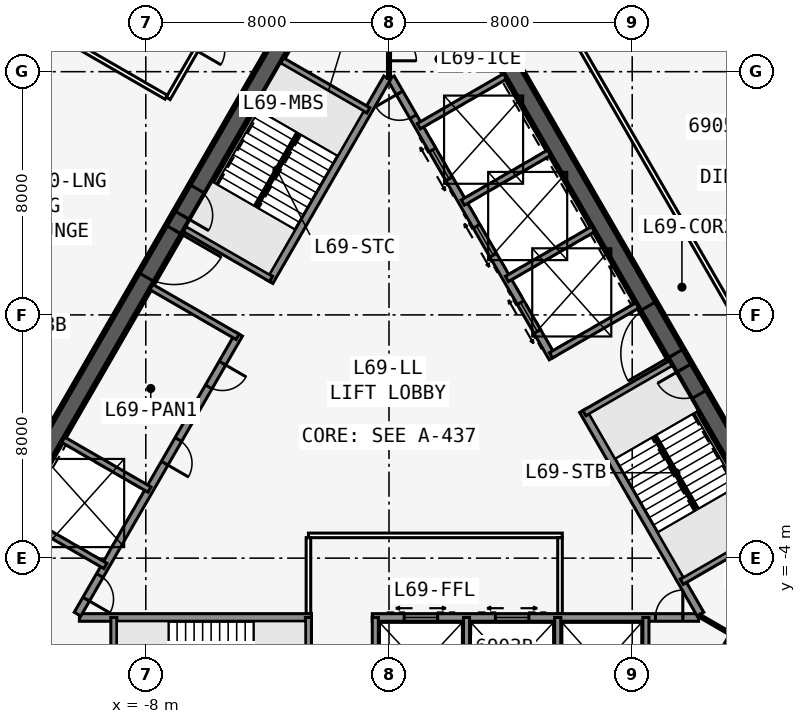
"""IFC4 building model, lengths in metres.
Left out: names, types, materials, properties, quantities, classifications, styles, units other than length and angle.
Written with IfcOpenShell. Run it as: python <this file> out.ifc"""

import sys

from ifc_helpers import new_model, si_unit, direction, frame, frame_2d, origin, place, context, subcontext, project, spatial, rectangle, extrude, element, fill, save


model = new_model("IFC4")
c1 = context("Model", 3, precision=1e-05, world=origin(), true_north=direction((0.0, 1.0)))
c2 = subcontext(c1, "Body", "Model", "MODEL_VIEW")
j1 = project(units=[si_unit("LENGTHUNIT", "METRE"), si_unit("PLANEANGLEUNIT", "RADIAN")], contexts=[c1])
p1 = place(None, origin())
s1 = spatial("IfcSite", under=j1, at=p1, CompositionType="ELEMENT")
p2 = place(p1, origin())
s2 = spatial("IfcBuilding", under=s1, at=p2, CompositionType="ELEMENT")
p3 = place(p2, frame((0.0, 0.0, 260.9)))
s3 = spatial("IfcBuildingStorey", under=s2, at=p3, CompositionType="ELEMENT", Elevation=260.9)
p4 = place(p3, frame((-10.183, -5.951, 0.0), z_axis=(0.0, 0.0, 1.0), x_axis=(1.0, 0.0, 0.0)))
e1 = element("IfcWall", 1, at=p4, inside=s3, PredefinedType="SOLIDWALL", context=c2, shape_type="SweptSolid", body=[
    extrude(rectangle(XDim=7.633, YDim=0.25, at=frame_2d((3.816, 0.0))), origin(), (0.0, 0.0, 1.0), 3.435),
])
p5 = place(p3, frame((-0.55, -5.951, 0.0), z_axis=(0.0, 0.0, 1.0), x_axis=(1.0, 0.0, 0.0)))
e2 = element("IfcWall", 2, at=p5, inside=s3, PredefinedType="SOLIDWALL", context=c2, shape_type="SweptSolid", body=[
    extrude(rectangle(XDim=10.733, YDim=0.25, at=frame_2d((5.366, 0.0))), origin(), (0.0, 0.0, 1.0), 3.435),
])
p6 = place(p5, frame((9.314, 0.0, 0.0)))
e3 = element("IfcOpeningElement", 3, at=p6, cuts=e2, PredefinedType="OPENING", context=c2, shape_type="SweptSolid", body=[
    extrude(rectangle(XDim=0.9, YDim=2.13, at=frame_2d((0.45, 1.065))), frame((0.0, 0.135, 0.0), z_axis=(0.0, -1.0, 0.0), x_axis=(1.0, 0.0, 0.0)), (0.0, 0.0, 1.0), 0.27),
])
p7 = place(p5, frame((1.05, 0.0, 0.0)))
e4 = element("IfcOpeningElement", 4, at=p7, cuts=e2, PredefinedType="OPENING", context=c2, shape_type="SweptSolid", body=[
    extrude(rectangle(XDim=1.1, YDim=2.13, at=frame_2d((0.55, 1.065))), frame((0.0, 0.135, 0.0), z_axis=(0.0, -1.0, 0.0), x_axis=(1.0, 0.0, 0.0)), (0.0, 0.0, 1.0), 0.27),
])
p8 = place(p5, frame((4.05, 0.0, 0.0)))
e5 = element("IfcOpeningElement", 5, at=p8, cuts=e2, PredefinedType="OPENING", context=c2, shape_type="SweptSolid", body=[
    extrude(rectangle(XDim=1.1, YDim=2.13, at=frame_2d((0.55, 1.065))), frame((0.0, 0.135, 0.0), z_axis=(0.0, -1.0, 0.0), x_axis=(1.0, 0.0, 0.0)), (0.0, 0.0, 1.0), 0.27),
])
p9 = place(p3, frame((-9.05, -5.951, 0.0), z_axis=(0.0, 0.0, 1.0), x_axis=(0.0, -1.0, 0.0)))
e6 = element("IfcWall", 6, at=p9, inside=s3, PredefinedType="SOLIDWALL", context=c2, shape_type="SweptSolid", body=[
    extrude(rectangle(XDim=3.275, YDim=0.2, at=frame_2d((1.637, 0.0))), origin(), (0.0, 0.0, 1.0), 3.435),
])
p10 = place(p3, frame((-2.65, -5.951, 0.0), z_axis=(0.0, 0.0, 1.0), x_axis=(0.0, -1.0, 0.0)))
e7 = element("IfcWall", 7, at=p10, inside=s3, PredefinedType="SOLIDWALL", context=c2, shape_type="SweptSolid", body=[
    extrude(rectangle(XDim=3.275, YDim=0.2, at=frame_2d((1.637, 0.0))), origin(), (0.0, 0.0, 1.0), 3.435),
])
p11 = place(p10, frame((1.675, 0.0, 0.0)))
e8 = element("IfcOpeningElement", 8, at=p11, cuts=e7, PredefinedType="OPENING", context=c2, shape_type="SweptSolid", body=[
    extrude(rectangle(XDim=1.0, YDim=2.13, at=frame_2d((0.5, 1.065))), frame((0.0, 0.11, 0.0), z_axis=(0.0, -1.0, 0.0), x_axis=(1.0, 0.0, 0.0)), (0.0, 0.0, 1.0), 0.22),
])
for number, where, z_axis, x_axis in (
    (9, (-0.45, -5.951, 0.0), (0.0, 0.0, 1.0), (0.0, -1.0, 0.0)),
    (10, (2.55, -5.951, 0.0), (0.0, 0.0, 1.0), (0.0, -1.0, 0.0)),
    (11, (5.55, -5.951, 0.0), (0.0, 0.0, 1.0), (0.0, -1.0, 0.0)),
    (12, (8.45, -5.951, 0.0), (0.0, 0.0, 1.0), (0.0, -1.0, 0.0)),
):
    element("IfcWall", number, at=place(p3, frame(where, z_axis=z_axis, x_axis=x_axis)), inside=s3, PredefinedType="SOLIDWALL", context=c2, shape_type="SweptSolid", body=[
        extrude(rectangle(XDim=3.275, YDim=0.2, at=frame_2d((1.637, 0.0))), origin(), (0.0, 0.0, 1.0), 3.435),
    ])
p12 = place(p3, frame((16.5, -9.526, 0.0), z_axis=(0.0, 0.0, 1.0), x_axis=(-0.499999749417, 0.866025548458, 0.0)))
e13 = element("IfcWall", 13, at=p12, inside=s3, PredefinedType="SHEAR", context=c2, shape_type="SweptSolid", body=[
    extrude(rectangle(XDim=33.0, YDim=0.6, at=frame_2d((16.5, 0.0))), origin(), (0.0, 0.0, 1.0), 3.6),
])
p13 = place(p12, frame((14.15, 0.0, 0.0)))
e14 = element("IfcOpeningElement", 14, at=p13, cuts=e13, PredefinedType="OPENING", context=c2, shape_type="SweptSolid", body=[
    extrude(rectangle(XDim=1.8, YDim=2.13, at=frame_2d((0.9, 1.065))), frame((0.0, 0.31, 0.0), z_axis=(0.0, -1.0, 0.0), x_axis=(1.0, 0.0, 0.0)), (0.0, 0.0, 1.0), 0.62),
])
p14 = place(p12, frame((12.6, 0.0, 0.0)))
e15 = element("IfcOpeningElement", 15, at=p14, cuts=e13, PredefinedType="OPENING", context=c2, shape_type="SweptSolid", body=[
    extrude(rectangle(XDim=1.0, YDim=2.13, at=frame_2d((0.5, 1.065))), frame((0.0, 0.31, 0.0), z_axis=(0.0, -1.0, 0.0), x_axis=(1.0, 0.0, 0.0)), (0.0, 0.0, 1.0), 0.62),
])
p15 = place(p3, frame((10.245, -5.843, 0.0), z_axis=(0.0, 0.0, 1.0), x_axis=(-0.499993009313, 0.866029439822, 0.0)))
e16 = element("IfcWall", 16, at=p15, inside=s3, PredefinedType="SOLIDWALL", context=c2, shape_type="SweptSolid", body=[
    extrude(rectangle(XDim=7.733, YDim=0.25, at=frame_2d((3.866, 0.0))), origin(), (0.0, 0.0, 1.0), 3.435),
])
p16 = place(p3, frame((5.379, 2.586, 0.0), z_axis=(0.0, 0.0, 1.0), x_axis=(-0.500001375892, 0.866024609411, 0.0)))
e17 = element("IfcWall", 17, at=p16, inside=s3, PredefinedType="SOLIDWALL", context=c2, shape_type="SweptSolid", body=[
    extrude(rectangle(XDim=10.633, YDim=0.25, at=frame_2d((5.316, 0.0))), origin(), (0.0, 0.0, 1.0), 3.435),
])
p17 = place(p16, frame((9.164, 0.0, 0.0)))
e18 = element("IfcOpeningElement", 18, at=p17, cuts=e17, PredefinedType="OPENING", context=c2, shape_type="SweptSolid", body=[
    extrude(rectangle(XDim=0.9, YDim=2.13, at=frame_2d((0.45, 1.065))), frame((0.0, 0.135, 0.0), z_axis=(0.0, -1.0, 0.0), x_axis=(1.0, 0.0, 0.0)), (0.0, 0.0, 1.0), 0.27),
])
p18 = place(p16, frame((1.0, 0.0, 0.0)))
e19 = element("IfcOpeningElement", 19, at=p18, cuts=e17, PredefinedType="OPENING", context=c2, shape_type="SweptSolid", body=[
    extrude(rectangle(XDim=1.1, YDim=2.13, at=frame_2d((0.55, 1.065))), frame((0.0, 0.135, 0.0), z_axis=(0.0, -1.0, 0.0), x_axis=(1.0, 0.0, 0.0)), (0.0, 0.0, 1.0), 0.27),
])
p19 = place(p16, frame((3.9, 0.0, 0.0)))
e20 = element("IfcOpeningElement", 20, at=p19, cuts=e17, PredefinedType="OPENING", context=c2, shape_type="SweptSolid", body=[
    extrude(rectangle(XDim=1.1, YDim=2.13, at=frame_2d((0.55, 1.065))), frame((0.0, 0.135, 0.0), z_axis=(0.0, -1.0, 0.0), x_axis=(1.0, 0.0, 0.0)), (0.0, 0.0, 1.0), 0.27),
])
p20 = place(p16, frame((6.8, 0.0, 0.0)))
e21 = element("IfcOpeningElement", 21, at=p20, cuts=e17, PredefinedType="OPENING", context=c2, shape_type="SweptSolid", body=[
    extrude(rectangle(XDim=1.1, YDim=2.13, at=frame_2d((0.55, 1.065))), frame((0.0, 0.135, 0.0), z_axis=(0.0, -1.0, 0.0), x_axis=(1.0, 0.0, 0.0)), (0.0, 0.0, 1.0), 0.27),
])
p21 = place(p3, frame((9.629, -4.775, 0.0), z_axis=(0.0, 0.0, 1.0), x_axis=(0.865995643347, 0.500051543047, 0.0)))
e22 = element("IfcWall", 22, at=p21, inside=s3, PredefinedType="SOLIDWALL", context=c2, shape_type="SweptSolid", body=[
    extrude(rectangle(XDim=3.275, YDim=0.2, at=frame_2d((1.638, 0.0))), origin(), (0.0, 0.0, 1.0), 3.435),
])
for number, where, z_axis, x_axis in (
    (23, (6.429, 0.767, 0.0), (0.0, 0.0, 1.0), (0.866, 0.5, 0.0)),
    (24, (5.329, 2.673, 0.0), (0.0, 0.0, 1.0), (0.866, 0.5, 0.0)),
    (25, (3.879, 5.184, 0.0), (0.0, 0.0, 1.0), (0.866, 0.5, 0.0)),
    (26, (2.429, 7.696, 0.0), (0.0, 0.0, 1.0), (0.866, 0.5, 0.0)),
    (27, (0.979, 10.207, 0.0), (0.0, 0.0, 1.0), (0.866, 0.5, 0.0)),
):
    element("IfcWall", number, at=place(p3, frame(where, z_axis=z_axis, x_axis=x_axis)), inside=s3, PredefinedType="SOLIDWALL", context=c2, shape_type="SweptSolid", body=[
        extrude(rectangle(XDim=3.275, YDim=0.2, at=frame_2d((1.637, 0.0))), origin(), (0.0, 0.0, 1.0), 3.435),
    ])
p22 = place(p3, frame((0.0, 19.052, 0.0), z_axis=(0.0, 0.0, 1.0), x_axis=(-0.499999749417, -0.866025548458, 0.0)))
e28 = element("IfcWall", 28, at=p22, inside=s3, PredefinedType="SHEAR", context=c2, shape_type="SweptSolid", body=[
    extrude(rectangle(XDim=33.0, YDim=0.6, at=frame_2d((16.5, 0.0))), origin(), (0.0, 0.0, 1.0), 3.6),
])
p23 = place(p22, frame((14.15, 0.0, 0.0)))
e29 = element("IfcOpeningElement", 29, at=p23, cuts=e28, PredefinedType="OPENING", context=c2, shape_type="SweptSolid", body=[
    extrude(rectangle(XDim=1.8, YDim=2.13, at=frame_2d((0.9, 1.065))), frame((0.0, 0.31, 0.0), z_axis=(0.0, -1.0, 0.0), x_axis=(1.0, 0.0, 0.0)), (0.0, 0.0, 1.0), 0.62),
])
p24 = place(p22, frame((12.6, 0.0, 0.0)))
e30 = element("IfcOpeningElement", 30, at=p24, cuts=e28, PredefinedType="OPENING", context=c2, shape_type="SweptSolid", body=[
    extrude(rectangle(XDim=1.0, YDim=2.13, at=frame_2d((0.5, 1.065))), frame((0.0, 0.31, 0.0), z_axis=(0.0, -1.0, 0.0), x_axis=(1.0, 0.0, 0.0)), (0.0, 0.0, 1.0), 0.62),
])
p25 = place(p3, frame((-0.062, 11.794, 0.0), z_axis=(0.0, 0.0, 1.0), x_axis=(-0.500006680225, -0.86602154692, 0.0)))
e31 = element("IfcWall", 31, at=p25, inside=s3, PredefinedType="SOLIDWALL", context=c2, shape_type="SweptSolid", body=[
    extrude(rectangle(XDim=7.733, YDim=0.25, at=frame_2d((3.866, 0.0))), origin(), (0.0, 0.0, 1.0), 3.435),
])
p26 = place(p3, frame((-4.929, 3.365, 0.0), z_axis=(0.0, 0.0, 1.0), x_axis=(-0.499991433582, -0.866030349552, 0.0)))
e32 = element("IfcWall", 32, at=p26, inside=s3, PredefinedType="SOLIDWALL", context=c2, shape_type="SweptSolid", body=[
    extrude(rectangle(XDim=10.633, YDim=0.25, at=frame_2d((5.316, 0.0))), origin(), (0.0, 0.0, 1.0), 3.435),
])
p27 = place(p26, frame((9.164, 0.0, 0.0)))
e33 = element("IfcOpeningElement", 33, at=p27, cuts=e32, PredefinedType="OPENING", context=c2, shape_type="SweptSolid", body=[
    extrude(rectangle(XDim=0.9, YDim=2.13, at=frame_2d((0.45, 1.065))), frame((0.0, 0.135, 0.0), z_axis=(0.0, -1.0, 0.0), x_axis=(1.0, 0.0, 0.0)), (0.0, 0.0, 1.0), 0.27),
])
p28 = place(p26, frame((1.1, 0.0, 0.0)))
e34 = element("IfcOpeningElement", 34, at=p28, cuts=e32, PredefinedType="OPENING", context=c2, shape_type="SweptSolid", body=[
    extrude(rectangle(XDim=0.9, YDim=2.13, at=frame_2d((0.45, 1.065))), frame((0.0, 0.135, 0.0), z_axis=(0.0, -1.0, 0.0), x_axis=(1.0, 0.0, 0.0)), (0.0, 0.0, 1.0), 0.27),
])
p29 = place(p26, frame((4.0, 0.0, 0.0)))
e35 = element("IfcOpeningElement", 35, at=p29, cuts=e32, PredefinedType="OPENING", context=c2, shape_type="SweptSolid", body=[
    extrude(rectangle(XDim=0.9, YDim=2.13, at=frame_2d((0.45, 1.065))), frame((0.0, 0.135, 0.0), z_axis=(0.0, -1.0, 0.0), x_axis=(1.0, 0.0, 0.0)), (0.0, 0.0, 1.0), 0.27),
])
for number, where, z_axis, x_axis in (
    (36, (-0.679, 10.727, 0.0), (0.0, 0.0, 1.0), (-0.866, 0.5, 0.0)),
    (37, (-3.879, 5.184, 0.0), (0.0, 0.0, 1.0), (-0.866, 0.5, 0.0)),
    (38, (-4.979, 3.279, 0.0), (0.0, 0.0, 1.0), (-0.866, 0.5, 0.0)),
    (39, (-7.879, -1.744, 0.0), (0.0, 0.0, 1.0), (-0.866, 0.5, 0.0)),
    (40, (-9.329, -4.256, 0.0), (0.0, 0.0, 1.0), (-0.866, 0.5, 0.0)),
):
    element("IfcWall", number, at=place(p3, frame(where, z_axis=z_axis, x_axis=x_axis)), inside=s3, PredefinedType="SOLIDWALL", context=c2, shape_type="SweptSolid", body=[
        extrude(rectangle(XDim=3.275, YDim=0.2, at=frame_2d((1.637, 0.0))), origin(), (0.0, 0.0, 1.0), 3.435),
    ])
p30 = place(p3, frame((20.177, -11.245, 0.0), z_axis=(0.0, 0.0, 1.0), x_axis=(-0.499998875317, 0.866026053119, 0.0)))
e41 = element("IfcWall", 41, at=p30, inside=s3, PredefinedType="PARTITIONING", context=c2, shape_type="SweptSolid", body=[
    extrude(rectangle(XDim=39.654, YDim=0.15, at=frame_2d((19.827, 0.0))), origin(), (0.0, 0.0, 1.0), 3.435),
])
p31 = place(p30, frame((10.352, 0.0, 0.0)))
e42 = element("IfcOpeningElement", 42, at=p31, cuts=e41, PredefinedType="OPENING", context=c2, shape_type="SweptSolid", body=[
    extrude(rectangle(XDim=0.95, YDim=2.13, at=frame_2d((0.475, 1.065))), frame((0.0, 0.085, 0.0), z_axis=(0.0, -1.0, 0.0), x_axis=(1.0, 0.0, 0.0)), (0.0, 0.0, 1.0), 0.17),
])
p32 = place(p3, frame((-0.35, 23.096, 0.0), z_axis=(0.0, 0.0, 1.0), x_axis=(-0.499996044987, -0.8660276872, 0.0)))
e43 = element("IfcWall", 43, at=p32, inside=s3, PredefinedType="PARTITIONING", context=c2, shape_type="SweptSolid", body=[
    extrude(rectangle(XDim=13.827, YDim=0.15, at=frame_2d((6.913, 0.0))), origin(), (0.0, 0.0, 1.0), 3.435),
])
p33 = place(p32, frame((3.652, 0.0, 0.0)))
e44 = element("IfcOpeningElement", 44, at=p33, cuts=e43, PredefinedType="OPENING", context=c2, shape_type="SweptSolid", body=[
    extrude(rectangle(XDim=0.95, YDim=2.13, at=frame_2d((0.475, 1.065))), frame((0.0, 0.085, 0.0), z_axis=(0.0, -1.0, 0.0), x_axis=(1.0, 0.0, 0.0)), (0.0, 0.0, 1.0), 0.17),
])
p34 = place(p32, frame((11.052, 0.0, 0.0)))
e45 = element("IfcOpeningElement", 45, at=p34, cuts=e43, PredefinedType="OPENING", context=c2, shape_type="SweptSolid", body=[
    extrude(rectangle(XDim=0.95, YDim=2.13, at=frame_2d((0.475, 1.065))), frame((0.0, 0.085, 0.0), z_axis=(0.0, -1.0, 0.0), x_axis=(1.0, 0.0, 0.0)), (0.0, 0.0, 1.0), 0.17),
])
p35 = place(p3, frame((-7.329, 11.159, 0.0), z_axis=(0.0, 0.0, 1.0), x_axis=(-0.866020720842, 0.500008111007, 0.0)))
e46 = element("IfcWall", 46, at=p35, inside=s3, PredefinedType="PARTITIONING", context=c2, shape_type="SweptSolid", body=[
    extrude(rectangle(XDim=6.732, YDim=0.15, at=frame_2d((3.366, 0.0))), origin(), (0.0, 0.0, 1.0), 3.435),
])
p36 = place(p3, frame((-2.65, -3.251, 0.0), z_axis=(0.0, 0.0, 1.0), x_axis=(1.0, 0.0, 0.0)))
e47 = element("IfcWall", 47, at=p36, inside=s3, PredefinedType="PARTITIONING", context=c2, shape_type="SweptSolid", body=[
    extrude(rectangle(XDim=8.35, YDim=0.15, at=frame_2d((4.175, 0.0))), origin(), (0.0, 0.0, 1.0), 3.435),
])
for number, where, z_axis, x_axis in (
    (48, (-2.65, -5.826, 0.0), (0.0, 0.0, 1.0), (0.0, 1.0, 0.0)),
    (49, (5.625, -5.826, 0.0), (0.0, 0.0, 1.0), (0.0, 1.0, 0.0)),
):
    element("IfcWall", number, at=place(p3, frame(where, z_axis=z_axis, x_axis=x_axis)), inside=s3, PredefinedType="PARTITIONING", context=c2, shape_type="SweptSolid", body=[
        extrude(rectangle(XDim=2.5, YDim=0.15, at=frame_2d((1.25, 0.0))), origin(), (0.0, 0.0, 1.0), 3.435),
    ])
p37 = place(p3, frame((13.729, -7.926, 0.0), z_axis=(0.0, 0.0, 1.0), x_axis=(-0.866029956157, 0.499992114976, 0.0)))
e50 = element("IfcWall", 50, at=p37, inside=s3, PredefinedType="PARTITIONING", context=c2, shape_type="SweptSolid", body=[
    extrude(rectangle(XDim=4.075, YDim=0.1, at=frame_2d((2.038, 0.0))), origin(), (0.0, 0.0, 1.0), 3.435),
])
p38 = place(p37, frame((1.995, 0.0, 0.0)))
e51 = element("IfcOpeningElement", 51, at=p38, cuts=e50, PredefinedType="OPENING", context=c2, shape_type="SweptSolid", body=[
    extrude(rectangle(XDim=0.9, YDim=2.13, at=frame_2d((0.45, 1.065))), frame((0.0, 0.06, 0.0), z_axis=(0.0, -1.0, 0.0), x_axis=(1.0, 0.0, 0.0)), (0.0, 0.0, 1.0), 0.12),
])
p39 = place(p3, frame((0.0, 14.353, 0.0), z_axis=(0.0, 0.0, 1.0), x_axis=(0.0, -1.0, 0.0)))
e52 = element("IfcWall", 52, at=p39, inside=s3, PredefinedType="PARTITIONING", context=c2, shape_type="SweptSolid", body=[
    extrude(rectangle(XDim=2.575, YDim=0.1, at=frame_2d((1.288, 0.0))), origin(), (0.0, 0.0, 1.0), 3.435),
])
p40 = place(p39, frame((1.095, 0.0, 0.0)))
e53 = element("IfcOpeningElement", 53, at=p40, cuts=e52, PredefinedType="OPENING", context=c2, shape_type="SweptSolid", body=[
    extrude(rectangle(XDim=0.9, YDim=2.13, at=frame_2d((0.45, 1.065))), frame((0.0, 0.06, 0.0), z_axis=(0.0, -1.0, 0.0), x_axis=(1.0, 0.0, 0.0)), (0.0, 0.0, 1.0), 0.12),
])
for number, where, z_axis, x_axis in (
    (54, (10.135, -2.401, 0.0), (0.0, 0.0, 1.0), (-0.5, 0.866, 0.0)),
    (55, (-2.988, 9.978, 0.0), (0.0, 0.0, 1.0), (-0.5, -0.866, 0.0)),
):
    element("IfcWall", number, at=place(p3, frame(where, z_axis=z_axis, x_axis=x_axis)), inside=s3, PredefinedType="SOLIDWALL", context=c2, shape_type="SweptSolid", body=[
        extrude(rectangle(XDim=2.794, YDim=0.1, at=frame_2d((1.397, 0.0))), origin(), (0.0, 0.0, 1.0), 3.6),
    ])
p41 = place(p13, origin())
e56 = element("IfcDoor", 56, at=p41, inside=s3, OperationType="DOUBLE_DOOR_SINGLE_SWING", PredefinedType="DOOR", context=c2, shape_type="SweptSolid", body=[
    extrude(rectangle(XDim=1.8, YDim=2.13, at=frame_2d((0.9, 1.065))), frame((0.0, 0.025, 0.0), z_axis=(0.0, -1.0, 0.0), x_axis=(1.0, 0.0, 0.0)), (0.0, 0.0, 1.0), 0.05),
])
fill(e14, e56)
p42 = place(p14, origin())
e57 = element("IfcDoor", 57, at=p42, inside=s3, OperationType="SINGLE_SWING_RIGHT", PredefinedType="DOOR", context=c2, shape_type="SweptSolid", body=[
    extrude(rectangle(XDim=1.0, YDim=2.13, at=frame_2d((0.5, 1.065))), frame((0.0, 0.025, 0.0), z_axis=(0.0, -1.0, 0.0), x_axis=(1.0, 0.0, 0.0)), (0.0, 0.0, 1.0), 0.05),
])
fill(e15, e57)
p43 = place(p23, origin())
e58 = element("IfcDoor", 58, at=p43, inside=s3, OperationType="DOUBLE_DOOR_SINGLE_SWING", PredefinedType="DOOR", context=c2, shape_type="SweptSolid", body=[
    extrude(rectangle(XDim=1.8, YDim=2.13, at=frame_2d((0.9, 1.065))), frame((0.0, 0.025, 0.0), z_axis=(0.0, -1.0, 0.0), x_axis=(1.0, 0.0, 0.0)), (0.0, 0.0, 1.0), 0.05),
])
fill(e29, e58)
p44 = place(p24, origin())
e59 = element("IfcDoor", 59, at=p44, inside=s3, OperationType="SINGLE_SWING_RIGHT", PredefinedType="DOOR", context=c2, shape_type="SweptSolid", body=[
    extrude(rectangle(XDim=1.0, YDim=2.13, at=frame_2d((0.5, 1.065))), frame((0.0, 0.025, 0.0), z_axis=(0.0, -1.0, 0.0), x_axis=(1.0, 0.0, 0.0)), (0.0, 0.0, 1.0), 0.05),
])
fill(e30, e59)
p45 = place(p6, origin())
e60 = element("IfcDoor", 60, at=p45, inside=s3, OperationType="SINGLE_SWING_RIGHT", PredefinedType="DOOR", context=c2, shape_type="SweptSolid", body=[
    extrude(rectangle(XDim=0.9, YDim=2.13, at=frame_2d((0.45, 1.065))), frame((0.0, 0.025, 0.0), z_axis=(0.0, -1.0, 0.0), x_axis=(1.0, 0.0, 0.0)), (0.0, 0.0, 1.0), 0.05),
])
fill(e3, e60)
p46 = place(p17, origin())
e61 = element("IfcDoor", 61, at=p46, inside=s3, OperationType="SINGLE_SWING_RIGHT", PredefinedType="DOOR", context=c2, shape_type="SweptSolid", body=[
    extrude(rectangle(XDim=0.9, YDim=2.13, at=frame_2d((0.45, 1.065))), frame((0.0, 0.025, 0.0), z_axis=(0.0, -1.0, 0.0), x_axis=(1.0, 0.0, 0.0)), (0.0, 0.0, 1.0), 0.05),
])
fill(e18, e61)
p47 = place(p40, origin())
e62 = element("IfcDoor", 62, at=p47, inside=s3, OperationType="SINGLE_SWING_RIGHT", PredefinedType="DOOR", context=c2, shape_type="SweptSolid", body=[
    extrude(rectangle(XDim=0.9, YDim=2.13, at=frame_2d((0.45, 1.065))), frame((0.0, 0.025, 0.0), z_axis=(0.0, -1.0, 0.0), x_axis=(1.0, 0.0, 0.0)), (0.0, 0.0, 1.0), 0.05),
])
fill(e53, e62)
p48 = place(p27, origin())
e63 = element("IfcDoor", 63, at=p48, inside=s3, OperationType="SINGLE_SWING_RIGHT", PredefinedType="DOOR", context=c2, shape_type="SweptSolid", body=[
    extrude(rectangle(XDim=0.9, YDim=2.13, at=frame_2d((0.45, 1.065))), frame((0.0, 0.025, 0.0), z_axis=(0.0, -1.0, 0.0), x_axis=(1.0, 0.0, 0.0)), (0.0, 0.0, 1.0), 0.05),
])
fill(e33, e63)
p49 = place(p28, origin())
e64 = element("IfcDoor", 64, at=p49, inside=s3, OperationType="SINGLE_SWING_LEFT", PredefinedType="DOOR", context=c2, shape_type="SweptSolid", body=[
    extrude(rectangle(XDim=0.9, YDim=2.13, at=frame_2d((0.45, 1.065))), frame((0.0, 0.025, 0.0), z_axis=(0.0, -1.0, 0.0), x_axis=(1.0, 0.0, 0.0)), (0.0, 0.0, 1.0), 0.05),
])
fill(e34, e64)
p50 = place(p29, origin())
e65 = element("IfcDoor", 65, at=p50, inside=s3, OperationType="SINGLE_SWING_RIGHT", PredefinedType="DOOR", context=c2, shape_type="SweptSolid", body=[
    extrude(rectangle(XDim=0.9, YDim=2.13, at=frame_2d((0.45, 1.065))), frame((0.0, 0.025, 0.0), z_axis=(0.0, -1.0, 0.0), x_axis=(1.0, 0.0, 0.0)), (0.0, 0.0, 1.0), 0.05),
])
fill(e35, e65)
p51 = place(p7, origin())
e66 = element("IfcDoor", 66, at=p51, inside=s3, OperationType="DOUBLE_DOOR_SLIDING", PredefinedType="USERDEFINED", context=c2, shape_type="SweptSolid", body=[
    extrude(rectangle(XDim=1.1, YDim=2.13, at=frame_2d((0.55, 1.065))), frame((0.0, 0.025, 0.0), z_axis=(0.0, -1.0, 0.0), x_axis=(1.0, 0.0, 0.0)), (0.0, 0.0, 1.0), 0.05),
])
fill(e4, e66)
p52 = place(p8, origin())
e67 = element("IfcDoor", 67, at=p52, inside=s3, OperationType="DOUBLE_DOOR_SLIDING", PredefinedType="USERDEFINED", context=c2, shape_type="SweptSolid", body=[
    extrude(rectangle(XDim=1.1, YDim=2.13, at=frame_2d((0.55, 1.065))), frame((0.0, 0.025, 0.0), z_axis=(0.0, -1.0, 0.0), x_axis=(1.0, 0.0, 0.0)), (0.0, 0.0, 1.0), 0.05),
])
fill(e5, e67)
p53 = place(p18, origin())
e68 = element("IfcDoor", 68, at=p53, inside=s3, OperationType="DOUBLE_DOOR_SLIDING", PredefinedType="USERDEFINED", context=c2, shape_type="SweptSolid", body=[
    extrude(rectangle(XDim=1.1, YDim=2.13, at=frame_2d((0.55, 1.065))), frame((0.0, 0.025, 0.0), z_axis=(0.0, -1.0, 0.0), x_axis=(1.0, 0.0, 0.0)), (0.0, 0.0, 1.0), 0.05),
])
fill(e19, e68)
p54 = place(p19, origin())
e69 = element("IfcDoor", 69, at=p54, inside=s3, OperationType="DOUBLE_DOOR_SLIDING", PredefinedType="USERDEFINED", context=c2, shape_type="SweptSolid", body=[
    extrude(rectangle(XDim=1.1, YDim=2.13, at=frame_2d((0.55, 1.065))), frame((0.0, 0.025, 0.0), z_axis=(0.0, -1.0, 0.0), x_axis=(1.0, 0.0, 0.0)), (0.0, 0.0, 1.0), 0.05),
])
fill(e20, e69)
p55 = place(p20, origin())
e70 = element("IfcDoor", 70, at=p55, inside=s3, OperationType="DOUBLE_DOOR_SLIDING", PredefinedType="USERDEFINED", context=c2, shape_type="SweptSolid", body=[
    extrude(rectangle(XDim=1.1, YDim=2.13, at=frame_2d((0.55, 1.065))), frame((0.0, 0.025, 0.0), z_axis=(0.0, -1.0, 0.0), x_axis=(1.0, 0.0, 0.0)), (0.0, 0.0, 1.0), 0.05),
])
fill(e21, e70)
save(model, sys.argv[1])
